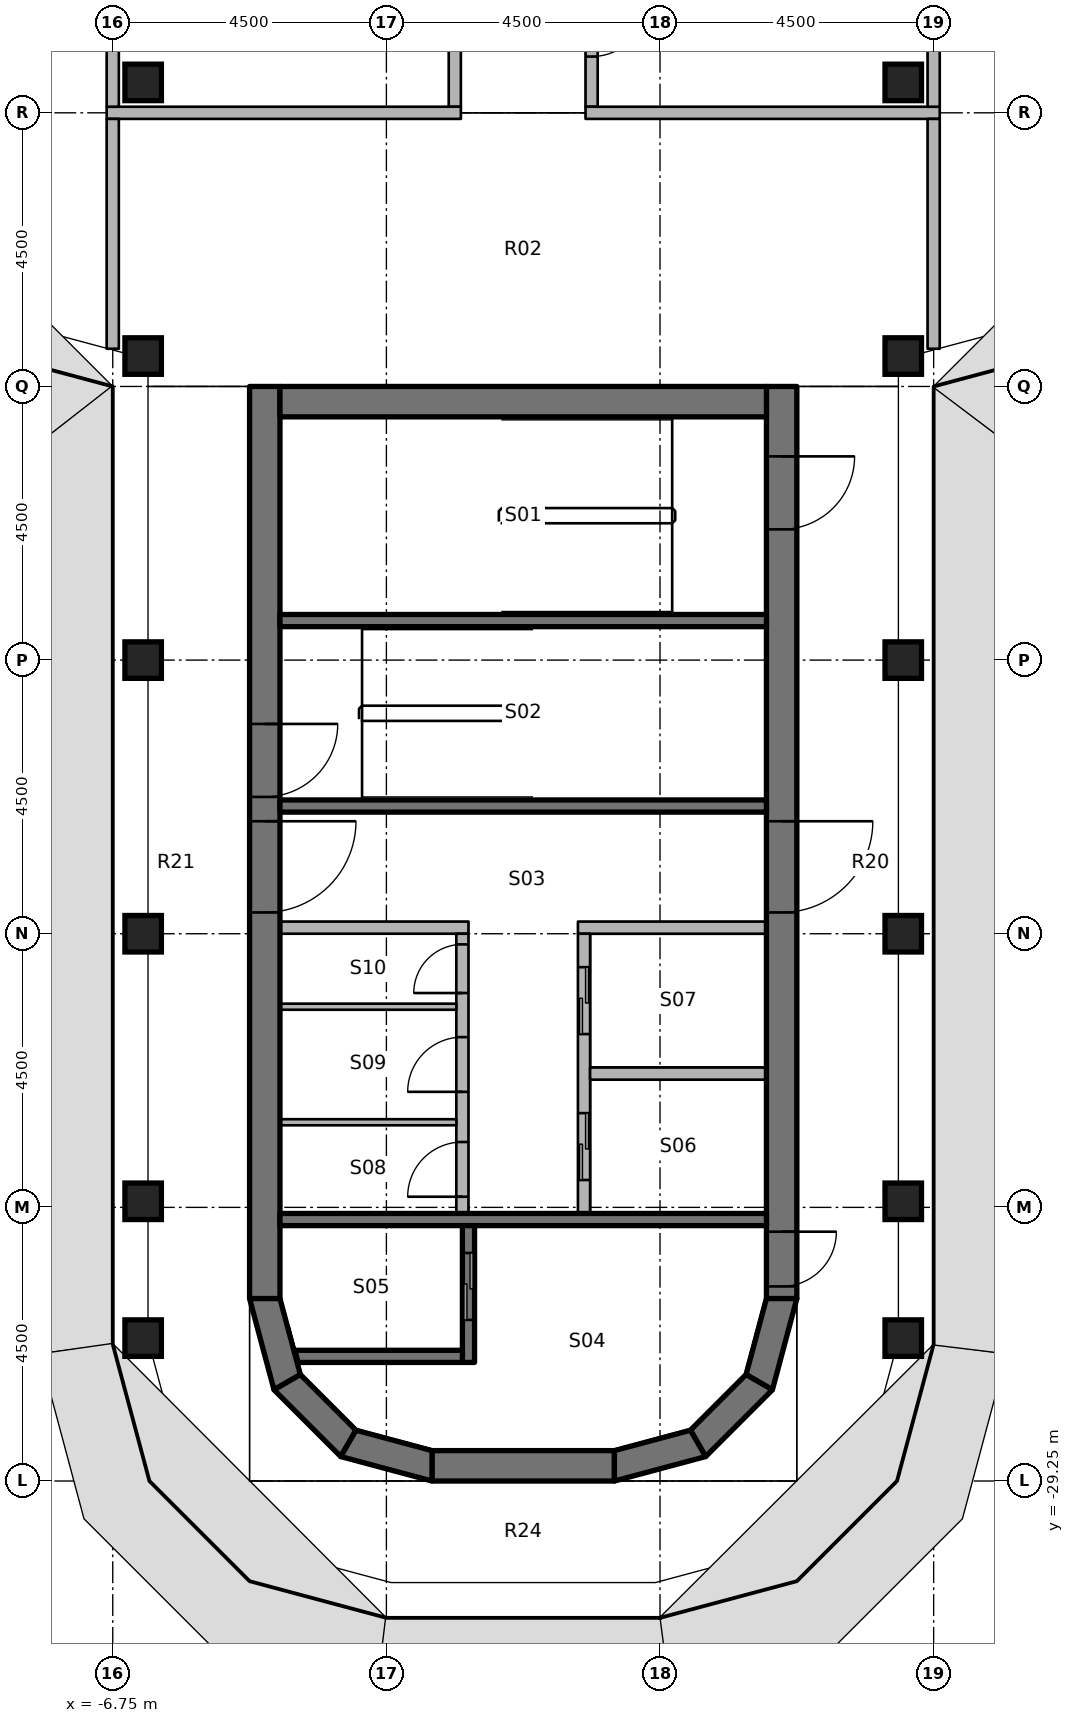
"""IFC4 building model, lengths in metres.
Left out: names, types, materials, properties, quantities, classifications, styles, units other than length and angle.
Written with IfcOpenShell. Run it as: python <this file> out.ifc"""

import sys

from ifc_helpers import new_model, si_unit, direction, frame, frame_2d, origin, origin_2d, place, context, subcontext, project, spatial, polyline, rectangle, outline, extrude, element, fill, save


model = new_model("IFC4")
c1 = context("Model", 3, precision=1e-05, world=origin(), true_north=direction((0.0, 1.0)))
c2 = subcontext(c1, "Body", "Model", "MODEL_VIEW")
j1 = project(units=[si_unit("LENGTHUNIT", "METRE"), si_unit("PLANEANGLEUNIT", "RADIAN")], contexts=[c1])
p1 = place(None, origin())
s1 = spatial("IfcSite", under=j1, at=p1, CompositionType="ELEMENT")
p2 = place(p1, origin())
s2 = spatial("IfcBuilding", under=s1, at=p2, CompositionType="ELEMENT")
p3 = place(p2, frame((0.0, 0.0, 265.0)))
s3 = spatial("IfcBuildingStorey", under=s2, at=p3, CompositionType="ELEMENT", Elevation=265.0)
for number, where, z_axis, x_axis in (
    (1, (-6.25, -26.9, 0.0), (0.0, 0.0, 1.0), (1.0, 0.0, 0.0)),
    (2, (-6.25, -24.65, 0.0), (0.0, 0.0, 1.0), (1.0, 0.0, 0.0)),
    (3, (-6.25, -20.25, 0.0), (0.0, 0.0, 1.0), (1.0, 0.0, 0.0)),
    (4, (-6.25, -15.75, 0.0), (0.0, 0.0, 1.0), (1.0, 0.0, 0.0)),
    (5, (-6.25, -10.75, 0.0), (0.0, 0.0, 1.0), (1.0, 0.0, 0.0)),
    (6, (-6.25, -6.25, 0.0), (0.0, 0.0, 1.0), (1.0, 0.0, 0.0)),
    (7, (6.25, -26.9, 0.0), (0.0, 0.0, 1.0), (1.0, 0.0, 0.0)),
    (8, (6.25, -24.65, 0.0), (0.0, 0.0, 1.0), (1.0, 0.0, 0.0)),
    (9, (6.25, -20.25, 0.0), (0.0, 0.0, 1.0), (1.0, 0.0, 0.0)),
    (10, (6.25, -15.75, 0.0), (0.0, 0.0, 1.0), (1.0, 0.0, 0.0)),
    (11, (6.25, -10.75, 0.0), (0.0, 0.0, 1.0), (1.0, 0.0, 0.0)),
    (12, (6.25, -6.25, 0.0), (0.0, 0.0, 1.0), (1.0, 0.0, 0.0)),
):
    element("IfcColumn", number, at=place(p3, frame(where, z_axis=z_axis, x_axis=x_axis)), inside=s3, PredefinedType="COLUMN", context=c2, shape_type="SweptSolid", body=[
        extrude(rectangle(XDim=0.6, YDim=0.6, at=origin_2d()), origin(), (0.0, 0.0, 1.0), 3.65),
    ])
p4 = place(p3, frame((-4.25, -11.25, 0.0), z_axis=(0.0, 0.0, 1.0), x_axis=(0.0, -1.0, 0.0)))
e13 = element("IfcWall", 13, at=p4, inside=s3, PredefinedType="SHEAR", context=c2, shape_type="SweptSolid", body=[
    extrude(rectangle(XDim=15.0, YDim=0.5, at=frame_2d((7.5, 0.0))), origin(), (0.0, 0.0, 1.0), 3.8),
])
p5 = place(p4, frame((7.15, 0.0, 0.0)))
e14 = element("IfcOpeningElement", 14, at=p5, cuts=e13, PredefinedType="OPENING", context=c2, shape_type="SweptSolid", body=[
    extrude(rectangle(XDim=1.5, YDim=2.3, at=frame_2d((0.75, 1.15))), frame((0.0, 0.26, 0.0), z_axis=(0.0, -1.0, 0.0), x_axis=(1.0, 0.0, 0.0)), (0.0, 0.0, 1.0), 0.52),
])
p6 = place(p4, frame((5.55, 0.0, 0.0)))
e15 = element("IfcOpeningElement", 15, at=p6, cuts=e13, PredefinedType="OPENING", context=c2, shape_type="SweptSolid", body=[
    extrude(rectangle(XDim=1.2, YDim=2.1, at=frame_2d((0.6, 1.05))), frame((0.0, 0.26, 0.0), z_axis=(0.0, -1.0, 0.0), x_axis=(1.0, 0.0, 0.0)), (0.0, 0.0, 1.0), 0.52),
])
p7 = place(p3, frame((4.25, -11.25, 0.0), z_axis=(0.0, 0.0, 1.0), x_axis=(0.0, -1.0, 0.0)))
e16 = element("IfcWall", 16, at=p7, inside=s3, PredefinedType="SHEAR", context=c2, shape_type="SweptSolid", body=[
    extrude(rectangle(XDim=15.0, YDim=0.5, at=frame_2d((7.5, 0.0))), origin(), (0.0, 0.0, 1.0), 3.8),
])
p8 = place(p7, frame((7.15, 0.0, 0.0)))
e17 = element("IfcOpeningElement", 17, at=p8, cuts=e16, PredefinedType="OPENING", context=c2, shape_type="SweptSolid", body=[
    extrude(rectangle(XDim=1.5, YDim=2.3, at=frame_2d((0.75, 1.15))), frame((0.0, 0.26, 0.0), z_axis=(0.0, -1.0, 0.0), x_axis=(1.0, 0.0, 0.0)), (0.0, 0.0, 1.0), 0.52),
])
p9 = place(p7, frame((13.9, 0.0, 0.0)))
e18 = element("IfcOpeningElement", 18, at=p9, cuts=e16, PredefinedType="OPENING", context=c2, shape_type="SweptSolid", body=[
    extrude(rectangle(XDim=0.9, YDim=2.1, at=frame_2d((0.45, 1.05))), frame((0.0, 0.26, 0.0), z_axis=(0.0, -1.0, 0.0), x_axis=(1.0, 0.0, 0.0)), (0.0, 0.0, 1.0), 0.52),
])
p10 = place(p7, frame((1.15, 0.0, 0.0)))
e19 = element("IfcOpeningElement", 19, at=p10, cuts=e16, PredefinedType="OPENING", context=c2, shape_type="SweptSolid", body=[
    extrude(rectangle(XDim=1.2, YDim=2.1, at=frame_2d((0.6, 1.05))), frame((0.0, 0.26, 0.0), z_axis=(0.0, -1.0, 0.0), x_axis=(1.0, 0.0, 0.0)), (0.0, 0.0, 1.0), 0.52),
])
p11 = place(p3, frame((-4.0, -11.5, 0.0), z_axis=(0.0, 0.0, 1.0), x_axis=(1.0, 0.0, 0.0)))
e20 = element("IfcWall", 20, at=p11, inside=s3, PredefinedType="SHEAR", context=c2, shape_type="SweptSolid", body=[
    extrude(rectangle(XDim=8.0, YDim=0.5, at=frame_2d((4.0, 0.0))), origin(), (0.0, 0.0, 1.0), 3.8),
])
p12 = place(p3, frame((-1.5, -29.0, 0.0), z_axis=(0.0, 0.0, 1.0), x_axis=(1.0, 0.0, 0.0)))
e21 = element("IfcWall", 21, at=p12, inside=s3, PredefinedType="SHEAR", context=c2, shape_type="SweptSolid", body=[
    extrude(rectangle(XDim=3.0, YDim=0.5, at=frame_2d((1.5, 0.0))), origin(), (0.0, 0.0, 1.0), 3.8),
])
p13 = place(p3, origin())
e22 = element("IfcWall", 22, at=p13, inside=s3, PredefinedType="SHEAR", context=c2, shape_type="SweptSolid", body=[
    extrude(outline(polyline([(-4.5, -26.25), (-4.098, -27.75), (-3.665, -27.5), (-4.0, -26.25), (-4.5, -26.25)])), origin(), (0.0, 0.0, 1.0), 3.8),
])
p14 = place(p3, origin())
e23 = element("IfcWall", 23, at=p14, inside=s3, PredefinedType="SHEAR", context=c2, shape_type="SweptSolid", body=[
    extrude(outline(polyline([(-4.098, -27.75), (-3.0, -28.848), (-2.75, -28.415), (-3.665, -27.5), (-4.098, -27.75)])), origin(), (0.0, 0.0, 1.0), 3.8),
])
p15 = place(p3, origin())
e24 = element("IfcWall", 24, at=p15, inside=s3, PredefinedType="SHEAR", context=c2, shape_type="SweptSolid", body=[
    extrude(outline(polyline([(-3.0, -28.848), (-1.5, -29.25), (-1.5, -28.75), (-2.75, -28.415), (-3.0, -28.848)])), origin(), (0.0, 0.0, 1.0), 3.8),
])
p16 = place(p3, origin())
e25 = element("IfcWall", 25, at=p16, inside=s3, PredefinedType="SHEAR", context=c2, shape_type="SweptSolid", body=[
    extrude(outline(polyline([(4.5, -26.25), (4.098, -27.75), (3.665, -27.5), (4.0, -26.25), (4.5, -26.25)])), origin(), (0.0, 0.0, 1.0), 3.8),
])
p17 = place(p3, origin())
e26 = element("IfcWall", 26, at=p17, inside=s3, PredefinedType="SHEAR", context=c2, shape_type="SweptSolid", body=[
    extrude(outline(polyline([(4.098, -27.75), (3.0, -28.848), (2.75, -28.415), (3.665, -27.5), (4.098, -27.75)])), origin(), (0.0, 0.0, 1.0), 3.8),
])
p18 = place(p3, origin())
e27 = element("IfcWall", 27, at=p18, inside=s3, PredefinedType="SHEAR", context=c2, shape_type="SweptSolid", body=[
    extrude(outline(polyline([(3.0, -28.848), (1.5, -29.25), (1.5, -28.75), (2.75, -28.415), (3.0, -28.848)])), origin(), (0.0, 0.0, 1.0), 3.8),
])
p19 = place(p3, frame((4.0, -24.95, 0.0), z_axis=(0.0, 0.0, 1.0), x_axis=(-1.0, 0.0, 0.0)))
e28 = element("IfcWall", 28, at=p19, inside=s3, PredefinedType="SHEAR", context=c2, shape_type="SweptSolid", body=[
    extrude(rectangle(XDim=8.0, YDim=0.2, at=frame_2d((4.0, 0.0))), origin(), (0.0, 0.0, 1.0), 3.65),
])
p20 = place(p3, frame((-0.9, -27.3, 0.0), z_axis=(0.0, 0.0, 1.0), x_axis=(0.0, 1.0, 0.0)))
e29 = element("IfcWall", 29, at=p20, inside=s3, PredefinedType="SHEAR", context=c2, shape_type="SweptSolid", body=[
    extrude(rectangle(XDim=2.25, YDim=0.2, at=frame_2d((1.125, 0.0))), origin(), (0.0, 0.0, 1.0), 3.65),
])
p21 = place(p20, frame((0.7, 0.0, 0.0)))
e30 = element("IfcOpeningElement", 30, at=p21, cuts=e29, PredefinedType="OPENING", context=c2, shape_type="SweptSolid", body=[
    extrude(rectangle(XDim=1.1, YDim=2.3, at=frame_2d((0.55, 1.15))), frame((0.0, 0.11, 0.0), z_axis=(0.0, -1.0, 0.0), x_axis=(1.0, 0.0, 0.0)), (0.0, 0.0, 1.0), 0.22),
])
p22 = place(p3, origin())
e31 = element("IfcWall", 31, at=p22, inside=s3, PredefinedType="SHEAR", context=c2, shape_type="SweptSolid", body=[
    extrude(outline(polyline([(-1.0, -27.1), (-3.755, -27.1), (-3.701, -27.3), (-1.0, -27.3), (-1.0, -27.1)])), origin(), (0.0, 0.0, 1.0), 3.65),
])
for number, where, z_axis, x_axis in (
    (32, (4.0, -18.15, 0.0), (0.0, 0.0, 1.0), (-1.0, 0.0, 0.0)),
    (33, (4.0, -15.1, 0.0), (0.0, 0.0, 1.0), (-1.0, 0.0, 0.0)),
):
    element("IfcWall", number, at=place(p3, frame(where, z_axis=z_axis, x_axis=x_axis)), inside=s3, PredefinedType="SHEAR", context=c2, shape_type="SweptSolid", body=[
        extrude(rectangle(XDim=8.0, YDim=0.2, at=frame_2d((4.0, 0.0))), origin(), (0.0, 0.0, 1.0), 3.65),
    ])
p23 = place(p3, frame((4.0, -20.15, 0.0), z_axis=(0.0, 0.0, 1.0), x_axis=(-1.0, 0.0, 0.0)))
e34 = element("IfcWall", 34, at=p23, inside=s3, PredefinedType="PARTITIONING", context=c2, shape_type="SweptSolid", body=[
    extrude(rectangle(XDim=3.1, YDim=0.2, at=frame_2d((1.55, 0.0))), origin(), (0.0, 0.0, 1.0), 3.65),
])
p24 = place(p3, frame((1.0, -24.85, 0.0), z_axis=(0.0, 0.0, 1.0), x_axis=(0.0, 1.0, 0.0)))
e35 = element("IfcWall", 35, at=p24, inside=s3, PredefinedType="PARTITIONING", context=c2, shape_type="SweptSolid", body=[
    extrude(rectangle(XDim=4.6, YDim=0.2, at=frame_2d((2.3, 0.0))), origin(), (0.0, 0.0, 1.0), 3.65),
])
p25 = place(p24, frame((0.55, 0.0, 0.0)))
e36 = element("IfcOpeningElement", 36, at=p25, cuts=e35, PredefinedType="OPENING", context=c2, shape_type="SweptSolid", body=[
    extrude(rectangle(XDim=1.1, YDim=2.3, at=frame_2d((0.55, 1.15))), frame((0.0, 0.11, 0.0), z_axis=(0.0, -1.0, 0.0), x_axis=(1.0, 0.0, 0.0)), (0.0, 0.0, 1.0), 0.22),
])
p26 = place(p24, frame((2.95, 0.0, 0.0)))
e37 = element("IfcOpeningElement", 37, at=p26, cuts=e35, PredefinedType="OPENING", context=c2, shape_type="SweptSolid", body=[
    extrude(rectangle(XDim=1.1, YDim=2.3, at=frame_2d((0.55, 1.15))), frame((0.0, 0.11, 0.0), z_axis=(0.0, -1.0, 0.0), x_axis=(1.0, 0.0, 0.0)), (0.0, 0.0, 1.0), 0.22),
])
p27 = place(p3, frame((-0.9, -20.15, 0.0), z_axis=(0.0, 0.0, 1.0), x_axis=(-1.0, 0.0, 0.0)))
e38 = element("IfcWall", 38, at=p27, inside=s3, PredefinedType="PARTITIONING", context=c2, shape_type="SweptSolid", body=[
    extrude(rectangle(XDim=3.1, YDim=0.2, at=frame_2d((1.55, 0.0))), origin(), (0.0, 0.0, 1.0), 3.65),
])
p28 = place(p3, frame((-1.0, -24.85, 0.0), z_axis=(0.0, 0.0, 1.0), x_axis=(0.0, 1.0, 0.0)))
e39 = element("IfcWall", 39, at=p28, inside=s3, PredefinedType="PARTITIONING", context=c2, shape_type="SweptSolid", body=[
    extrude(rectangle(XDim=4.6, YDim=0.2, at=frame_2d((2.3, 0.0))), origin(), (0.0, 0.0, 1.0), 3.65),
])
p29 = place(p28, frame((0.275, 0.0, 0.0)))
e40 = element("IfcOpeningElement", 40, at=p29, cuts=e39, PredefinedType="OPENING", context=c2, shape_type="SweptSolid", body=[
    extrude(rectangle(XDim=0.9, YDim=2.1, at=frame_2d((0.45, 1.05))), frame((0.0, 0.11, 0.0), z_axis=(0.0, -1.0, 0.0), x_axis=(1.0, 0.0, 0.0)), (0.0, 0.0, 1.0), 0.22),
])
p30 = place(p28, frame((2.0, 0.0, 0.0)))
e41 = element("IfcOpeningElement", 41, at=p30, cuts=e39, PredefinedType="OPENING", context=c2, shape_type="SweptSolid", body=[
    extrude(rectangle(XDim=0.9, YDim=2.1, at=frame_2d((0.45, 1.05))), frame((0.0, 0.11, 0.0), z_axis=(0.0, -1.0, 0.0), x_axis=(1.0, 0.0, 0.0)), (0.0, 0.0, 1.0), 0.22),
])
p31 = place(p28, frame((3.625, 0.0, 0.0)))
e42 = element("IfcOpeningElement", 42, at=p31, cuts=e39, PredefinedType="OPENING", context=c2, shape_type="SweptSolid", body=[
    extrude(rectangle(XDim=0.8, YDim=2.1, at=frame_2d((0.4, 1.05))), frame((0.0, 0.11, 0.0), z_axis=(0.0, -1.0, 0.0), x_axis=(1.0, 0.0, 0.0)), (0.0, 0.0, 1.0), 0.22),
])
p32 = place(p3, frame((4.0, -22.55, 0.0), z_axis=(0.0, 0.0, 1.0), x_axis=(-1.0, 0.0, 0.0)))
e43 = element("IfcWall", 43, at=p32, inside=s3, PredefinedType="PARTITIONING", context=c2, shape_type="SweptSolid", body=[
    extrude(rectangle(XDim=2.9, YDim=0.2, at=frame_2d((1.45, 0.0))), origin(), (0.0, 0.0, 1.0), 3.65),
])
for number, where, z_axis, x_axis in (
    (44, (-1.1, -23.35, 0.0), (0.0, 0.0, 1.0), (-1.0, 0.0, 0.0)),
    (45, (-1.1, -21.45, 0.0), (0.0, 0.0, 1.0), (-1.0, 0.0, 0.0)),
):
    element("IfcWall", number, at=place(p3, frame(where, z_axis=z_axis, x_axis=x_axis)), inside=s3, PredefinedType="PARTITIONING", context=c2, shape_type="SweptSolid", body=[
        extrude(rectangle(XDim=2.9, YDim=0.1, at=frame_2d((1.45, 0.0))), origin(), (0.0, 0.0, 1.0), 3.65),
    ])
p33 = place(p3, frame((1.125, -4.1, 0.0), z_axis=(0.0, 0.0, 1.0), x_axis=(0.0, -1.0, 0.0)))
e46 = element("IfcWall", 46, at=p33, inside=s3, PredefinedType="PARTITIONING", context=c2, shape_type="SweptSolid", body=[
    extrude(rectangle(XDim=2.55, YDim=0.2, at=frame_2d((1.275, 0.0))), origin(), (0.0, 0.0, 1.0), 2.75),
])
p34 = place(p33, frame((0.825, 0.0, 0.0)))
e47 = element("IfcOpeningElement", 47, at=p34, cuts=e46, PredefinedType="OPENING", context=c2, shape_type="SweptSolid", body=[
    extrude(rectangle(XDim=0.9, YDim=2.1, at=frame_2d((0.45, 1.05))), frame((0.0, 0.11, 0.0), z_axis=(0.0, -1.0, 0.0), x_axis=(1.0, 0.0, 0.0)), (0.0, 0.0, 1.0), 0.22),
])
p35 = place(p3, frame((-1.125, -6.65, 0.0), z_axis=(0.0, 0.0, 1.0), x_axis=(0.0, 1.0, 0.0)))
e48 = element("IfcWall", 48, at=p35, inside=s3, PredefinedType="PARTITIONING", context=c2, shape_type="SweptSolid", body=[
    extrude(rectangle(XDim=5.425, YDim=0.2, at=frame_2d((2.712, 0.0))), origin(), (0.0, 0.0, 1.0), 2.75),
])
p36 = place(p3, frame((1.025, -6.75, 0.0), z_axis=(0.0, 0.0, 1.0), x_axis=(1.0, 0.0, 0.0)))
e49 = element("IfcWall", 49, at=p36, inside=s3, PredefinedType="PARTITIONING", context=c2, shape_type="SweptSolid", body=[
    extrude(rectangle(XDim=5.825, YDim=0.2, at=frame_2d((2.913, 0.0))), origin(), (0.0, 0.0, 1.0), 2.75),
])
p37 = place(p3, frame((6.75, -10.63, 0.0), z_axis=(0.0, 0.0, 1.0), x_axis=(0.0, 1.0, 0.0)))
e50 = element("IfcWall", 50, at=p37, inside=s3, PredefinedType="PARTITIONING", context=c2, shape_type="SweptSolid", body=[
    extrude(rectangle(XDim=3.78, YDim=0.2, at=frame_2d((1.89, 0.0))), origin(), (0.0, 0.0, 1.0), 2.75),
])
p38 = place(p3, frame((-6.85, -6.75, 0.0), z_axis=(0.0, 0.0, 1.0), x_axis=(1.0, 0.0, 0.0)))
e51 = element("IfcWall", 51, at=p38, inside=s3, PredefinedType="PARTITIONING", context=c2, shape_type="SweptSolid", body=[
    extrude(rectangle(XDim=5.825, YDim=0.2, at=frame_2d((2.913, 0.0))), origin(), (0.0, 0.0, 1.0), 2.75),
])
p39 = place(p3, frame((-6.75, -10.63, 0.0), z_axis=(0.0, 0.0, 1.0), x_axis=(0.0, 1.0, 0.0)))
e52 = element("IfcWall", 52, at=p39, inside=s3, PredefinedType="PARTITIONING", context=c2, shape_type="SweptSolid", body=[
    extrude(rectangle(XDim=3.78, YDim=0.2, at=frame_2d((1.89, 0.0))), origin(), (0.0, 0.0, 1.0), 2.75),
])
p40 = place(p3, frame((6.75, -6.65, 0.0), z_axis=(0.0, 0.0, 1.0), x_axis=(0.0, 1.0, 0.0)))
e53 = element("IfcWall", 53, at=p40, inside=s3, PredefinedType="PARTITIONING", context=c2, shape_type="SweptSolid", body=[
    extrude(rectangle(XDim=2.55, YDim=0.2, at=frame_2d((1.275, 0.0))), origin(), (0.0, 0.0, 1.0), 2.75),
])
p41 = place(p3, frame((-6.75, -6.65, 0.0), z_axis=(0.0, 0.0, 1.0), x_axis=(0.0, 1.0, 0.0)))
e54 = element("IfcWall", 54, at=p41, inside=s3, PredefinedType="PARTITIONING", context=c2, shape_type="SweptSolid", body=[
    extrude(rectangle(XDim=5.425, YDim=0.2, at=frame_2d((2.712, 0.0))), origin(), (0.0, 0.0, 1.0), 2.75),
])
p42 = place(p8, origin())
e55 = element("IfcDoor", 55, at=p42, inside=s3, OperationType="DOUBLE_DOOR_SINGLE_SWING", PredefinedType="DOOR", context=c2, shape_type="SweptSolid", body=[
    extrude(rectangle(XDim=1.5, YDim=2.3, at=frame_2d((0.75, 1.15))), frame((0.0, 0.025, 0.0), z_axis=(0.0, -1.0, 0.0), x_axis=(1.0, 0.0, 0.0)), (0.0, 0.0, 1.0), 0.05),
])
fill(e17, e55)
p43 = place(p5, origin())
e56 = element("IfcDoor", 56, at=p43, inside=s3, OperationType="DOUBLE_DOOR_SINGLE_SWING", PredefinedType="DOOR", context=c2, shape_type="SweptSolid", body=[
    extrude(rectangle(XDim=1.5, YDim=2.3, at=frame_2d((0.75, 1.15))), frame((0.0, 0.025, 0.0), z_axis=(0.0, -1.0, 0.0), x_axis=(1.0, 0.0, 0.0)), (0.0, 0.0, 1.0), 0.05),
])
fill(e14, e56)
p44 = place(p9, origin())
e57 = element("IfcDoor", 57, at=p44, inside=s3, OperationType="SINGLE_SWING_LEFT", PredefinedType="DOOR", context=c2, shape_type="SweptSolid", body=[
    extrude(rectangle(XDim=0.9, YDim=2.1, at=frame_2d((0.45, 1.05))), frame((0.0, 0.025, 0.0), z_axis=(0.0, -1.0, 0.0), x_axis=(1.0, 0.0, 0.0)), (0.0, 0.0, 1.0), 0.05),
])
fill(e18, e57)
p45 = place(p6, origin())
e58 = element("IfcDoor", 58, at=p45, inside=s3, OperationType="SINGLE_SWING_RIGHT", PredefinedType="DOOR", context=c2, shape_type="SweptSolid", body=[
    extrude(rectangle(XDim=1.2, YDim=2.1, at=frame_2d((0.6, 1.05))), frame((0.0, 0.025, 0.0), z_axis=(0.0, -1.0, 0.0), x_axis=(1.0, 0.0, 0.0)), (0.0, 0.0, 1.0), 0.05),
])
fill(e15, e58)
p46 = place(p10, origin())
e59 = element("IfcDoor", 59, at=p46, inside=s3, OperationType="SINGLE_SWING_RIGHT", PredefinedType="DOOR", context=c2, shape_type="SweptSolid", body=[
    extrude(rectangle(XDim=1.2, YDim=2.1, at=frame_2d((0.6, 1.05))), frame((0.0, 0.025, 0.0), z_axis=(0.0, -1.0, 0.0), x_axis=(1.0, 0.0, 0.0)), (0.0, 0.0, 1.0), 0.05),
])
fill(e19, e59)
p47 = place(p21, origin())
e60 = element("IfcDoor", 60, at=p47, inside=s3, OperationType="DOUBLE_DOOR_SLIDING", PredefinedType="DOOR", context=c2, shape_type="SweptSolid", body=[
    extrude(rectangle(XDim=1.1, YDim=2.3, at=frame_2d((0.55, 1.15))), frame((0.0, 0.025, 0.0), z_axis=(0.0, -1.0, 0.0), x_axis=(1.0, 0.0, 0.0)), (0.0, 0.0, 1.0), 0.05),
])
fill(e30, e60)
p48 = place(p25, origin())
e61 = element("IfcDoor", 61, at=p48, inside=s3, OperationType="DOUBLE_DOOR_SLIDING", PredefinedType="DOOR", context=c2, shape_type="SweptSolid", body=[
    extrude(rectangle(XDim=1.1, YDim=2.3, at=frame_2d((0.55, 1.15))), frame((0.0, 0.025, 0.0), z_axis=(0.0, -1.0, 0.0), x_axis=(1.0, 0.0, 0.0)), (0.0, 0.0, 1.0), 0.05),
])
fill(e36, e61)
p49 = place(p26, origin())
e62 = element("IfcDoor", 62, at=p49, inside=s3, OperationType="DOUBLE_DOOR_SLIDING", PredefinedType="DOOR", context=c2, shape_type="SweptSolid", body=[
    extrude(rectangle(XDim=1.1, YDim=2.3, at=frame_2d((0.55, 1.15))), frame((0.0, 0.025, 0.0), z_axis=(0.0, -1.0, 0.0), x_axis=(1.0, 0.0, 0.0)), (0.0, 0.0, 1.0), 0.05),
])
fill(e37, e62)
p50 = place(p29, origin())
e63 = element("IfcDoor", 63, at=p50, inside=s3, OperationType="SINGLE_SWING_RIGHT", PredefinedType="DOOR", context=c2, shape_type="SweptSolid", body=[
    extrude(rectangle(XDim=0.9, YDim=2.1, at=frame_2d((0.45, 1.05))), frame((0.0, 0.025, 0.0), z_axis=(0.0, -1.0, 0.0), x_axis=(1.0, 0.0, 0.0)), (0.0, 0.0, 1.0), 0.05),
])
fill(e40, e63)
p51 = place(p30, origin())
e64 = element("IfcDoor", 64, at=p51, inside=s3, OperationType="SINGLE_SWING_LEFT", PredefinedType="DOOR", context=c2, shape_type="SweptSolid", body=[
    extrude(rectangle(XDim=0.9, YDim=2.1, at=frame_2d((0.45, 1.05))), frame((0.0, 0.025, 0.0), z_axis=(0.0, -1.0, 0.0), x_axis=(1.0, 0.0, 0.0)), (0.0, 0.0, 1.0), 0.05),
])
fill(e41, e64)
p52 = place(p31, origin())
e65 = element("IfcDoor", 65, at=p52, inside=s3, OperationType="SINGLE_SWING_RIGHT", PredefinedType="DOOR", context=c2, shape_type="SweptSolid", body=[
    extrude(rectangle(XDim=0.8, YDim=2.1, at=frame_2d((0.4, 1.05))), frame((0.0, 0.025, 0.0), z_axis=(0.0, -1.0, 0.0), x_axis=(1.0, 0.0, 0.0)), (0.0, 0.0, 1.0), 0.05),
])
fill(e42, e65)
p53 = place(p34, origin())
e66 = element("IfcDoor", 66, at=p53, inside=s3, OperationType="SINGLE_SWING_RIGHT", PredefinedType="DOOR", context=c2, shape_type="SweptSolid", body=[
    extrude(rectangle(XDim=0.9, YDim=2.1, at=frame_2d((0.45, 1.05))), frame((0.0, 0.025, 0.0), z_axis=(0.0, -1.0, 0.0), x_axis=(1.0, 0.0, 0.0)), (0.0, 0.0, 1.0), 0.05),
])
fill(e47, e66)
save(model, sys.argv[1])
